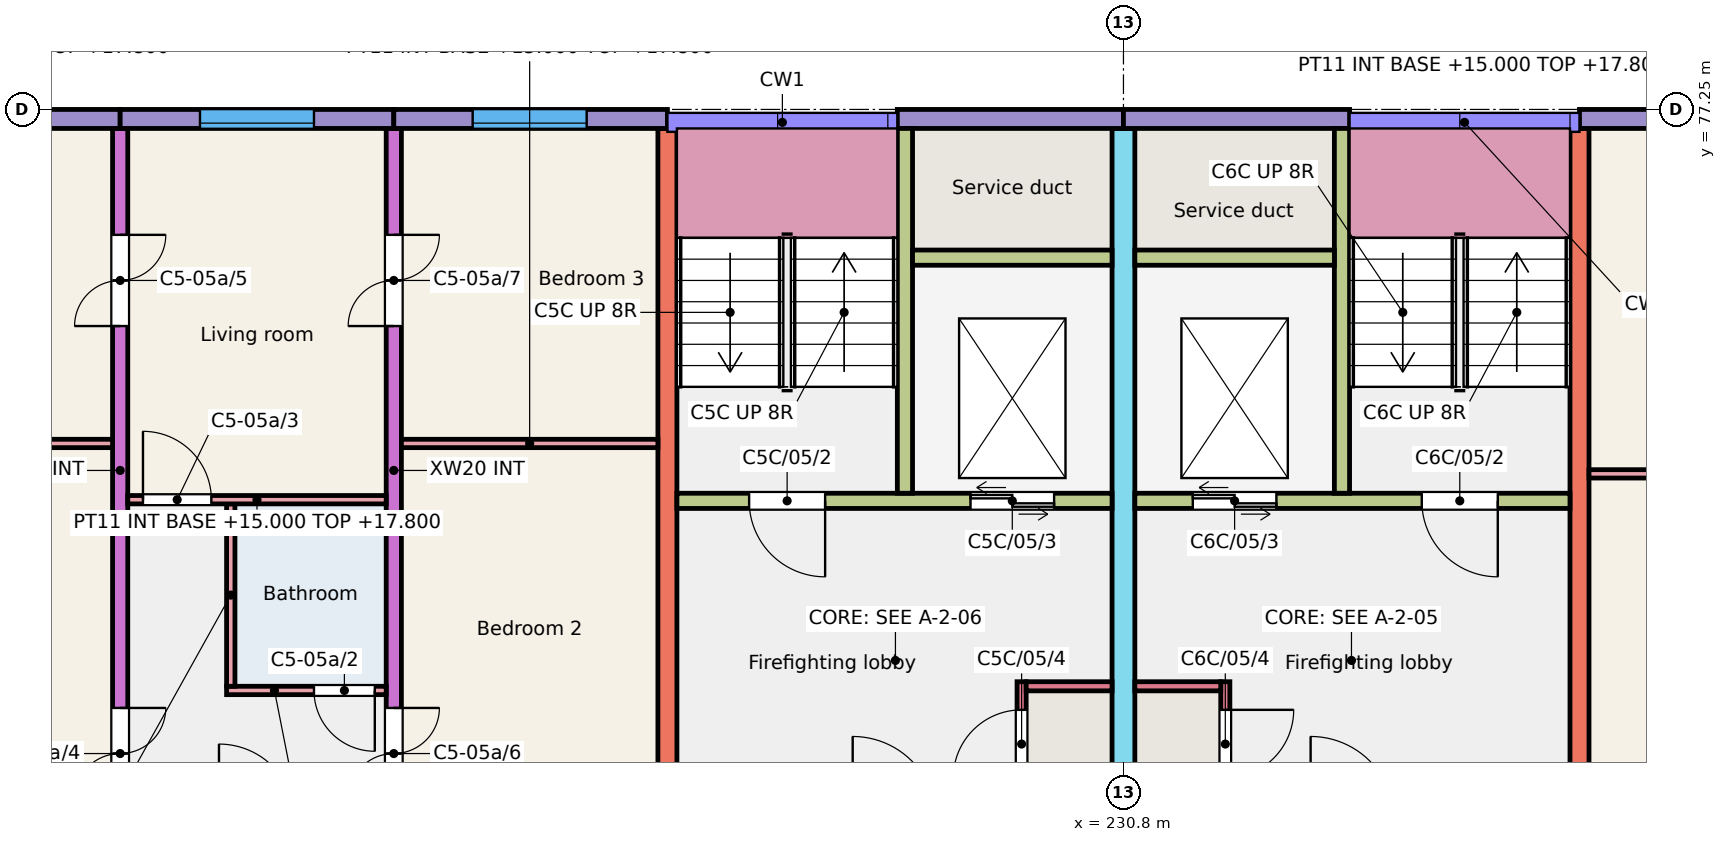
"""IFC4 building model, lengths in metres.
Left out: names, types, materials, properties, quantities, classifications, styles, units other than length and angle.
Written with IfcOpenShell. Run it as: python <this file> out.ifc"""

import sys

from ifc_helpers import new_model, si_unit, direction, frame, frame_2d, origin, place, context, subcontext, project, spatial, rectangle, extrude, element, fill, save


model = new_model("IFC4")
c1 = context("Model", 3, precision=1e-05, world=origin(), true_north=direction((0.0, 1.0)))
c2 = subcontext(c1, "Body", "Model", "MODEL_VIEW")
j1 = project(units=[si_unit("LENGTHUNIT", "METRE"), si_unit("PLANEANGLEUNIT", "RADIAN")], contexts=[c1])
p1 = place(None, origin())
s1 = spatial("IfcSite", under=j1, at=p1, CompositionType="ELEMENT")
p2 = place(p1, origin())
s2 = spatial("IfcBuilding", under=s1, at=p2, CompositionType="ELEMENT")
p3 = place(p2, frame((0.0, 0.0, 15.0)))
s3 = spatial("IfcBuildingStorey", under=s2, at=p3, CompositionType="ELEMENT", Elevation=15.0)
p4 = place(p3, frame((217.6, 68.0, 0.0), z_axis=(0.0, 0.0, 1.0), x_axis=(0.0, 1.0, 0.0)))
e1 = element("IfcWall", 1, at=p4, inside=s3, PredefinedType="SHEAR", context=c2, shape_type="SweptSolid", body=[
    extrude(rectangle(XDim=9.0, YDim=0.2, at=frame_2d((4.5, 0.0))), origin(), (0.0, 0.0, 1.0), 3.0),
])
p5 = place(p4, frame((0.175, 0.0, 0.0)))
e2 = element("IfcOpeningElement", 2, at=p5, cuts=e1, PredefinedType="OPENING", context=c2, shape_type="SweptSolid", body=[
    extrude(rectangle(XDim=1.2, YDim=2.1, at=frame_2d((0.6, 1.05))), frame((0.0, 0.11, 0.0), z_axis=(0.0, -1.0, 0.0), x_axis=(1.0, 0.0, 0.0)), (0.0, 0.0, 1.0), 0.22),
])
p6 = place(p4, frame((6.4, 0.0, 0.0)))
e3 = element("IfcOpeningElement", 3, at=p6, cuts=e1, PredefinedType="OPENING", context=c2, shape_type="SweptSolid", body=[
    extrude(rectangle(XDim=1.2, YDim=2.1, at=frame_2d((0.6, 1.05))), frame((0.0, 0.11, 0.0), z_axis=(0.0, -1.0, 0.0), x_axis=(1.0, 0.0, 0.0)), (0.0, 0.0, 1.0), 0.22),
])
p7 = place(p3, frame((221.2, 68.0, 0.0), z_axis=(0.0, 0.0, 1.0), x_axis=(0.0, 1.0, 0.0)))
e4 = element("IfcWall", 4, at=p7, inside=s3, PredefinedType="SHEAR", context=c2, shape_type="SweptSolid", body=[
    extrude(rectangle(XDim=9.0, YDim=0.2, at=frame_2d((4.5, 0.0))), origin(), (0.0, 0.0, 1.0), 3.0),
])
p8 = place(p7, frame((0.175, 0.0, 0.0)))
e5 = element("IfcOpeningElement", 5, at=p8, cuts=e4, PredefinedType="OPENING", context=c2, shape_type="SweptSolid", body=[
    extrude(rectangle(XDim=1.2, YDim=2.1, at=frame_2d((0.6, 1.05))), frame((0.0, 0.11, 0.0), z_axis=(0.0, -1.0, 0.0), x_axis=(1.0, 0.0, 0.0)), (0.0, 0.0, 1.0), 0.22),
])
p9 = place(p7, frame((6.4, 0.0, 0.0)))
e6 = element("IfcOpeningElement", 6, at=p9, cuts=e4, PredefinedType="OPENING", context=c2, shape_type="SweptSolid", body=[
    extrude(rectangle(XDim=1.2, YDim=2.1, at=frame_2d((0.6, 1.05))), frame((0.0, 0.11, 0.0), z_axis=(0.0, -1.0, 0.0), x_axis=(1.0, 0.0, 0.0)), (0.0, 0.0, 1.0), 0.22),
])
p10 = place(p3, frame((224.8, 68.0, 0.0), z_axis=(0.0, 0.0, 1.0), x_axis=(0.0, 1.0, 0.0)))
e7 = element("IfcWall", 7, at=p10, inside=s3, PredefinedType="SHEAR", context=c2, shape_type="SweptSolid", body=[
    extrude(rectangle(XDim=9.0, YDim=0.25, at=frame_2d((4.5, 0.0))), origin(), (0.0, 0.0, 1.0), 3.0),
])
p11 = place(p3, frame((230.8, 66.0, 0.0), z_axis=(0.0, 0.0, 1.0), x_axis=(0.0, 1.0, 0.0)))
e8 = element("IfcWall", 8, at=p11, inside=s3, PredefinedType="SHEAR", context=c2, shape_type="SweptSolid", body=[
    extrude(rectangle(XDim=11.0, YDim=0.3, at=frame_2d((5.5, 0.0))), origin(), (0.0, 0.0, 1.0), 3.0),
])
p12 = place(p11, frame((0.3, 0.0, 0.0)))
e9 = element("IfcOpeningElement", 9, at=p12, cuts=e8, PredefinedType="OPENING", context=c2, shape_type="SweptSolid", body=[
    extrude(rectangle(XDim=1.2, YDim=2.1, at=frame_2d((0.6, 1.05))), frame((0.0, 0.16, 0.0), z_axis=(0.0, -1.0, 0.0), x_axis=(1.0, 0.0, 0.0)), (0.0, 0.0, 1.0), 0.32),
])
p13 = place(p3, frame((236.8, 68.0, 0.0), z_axis=(0.0, 0.0, 1.0), x_axis=(0.0, 1.0, 0.0)))
e10 = element("IfcWall", 10, at=p13, inside=s3, PredefinedType="SHEAR", context=c2, shape_type="SweptSolid", body=[
    extrude(rectangle(XDim=9.0, YDim=0.25, at=frame_2d((4.5, 0.0))), origin(), (0.0, 0.0, 1.0), 3.0),
])
p14 = place(p3, frame((214.0, 77.125, 0.0), z_axis=(0.0, 0.0, 1.0), x_axis=(1.0, 0.0, 0.0)))
e11 = element("IfcWall", 11, at=p14, inside=s3, PredefinedType="SOLIDWALL", context=c2, shape_type="SweptSolid", body=[
    extrude(rectangle(XDim=3.6, YDim=0.25, at=frame_2d((1.8, 0.0))), origin(), (0.0, 0.0, 1.0), 3.0),
])
p15 = place(p14, frame((1.225, 0.0, 1.1)))
e12 = element("IfcOpeningElement", 12, at=p15, cuts=e11, PredefinedType="OPENING", context=c2, shape_type="SweptSolid", body=[
    extrude(rectangle(XDim=1.2, YDim=1.3, at=frame_2d((0.6, 0.65))), frame((0.0, 0.135, 0.0), z_axis=(0.0, -1.0, 0.0), x_axis=(1.0, 0.0, 0.0)), (0.0, 0.0, 1.0), 0.27),
])
p16 = place(p3, frame((217.6, 77.125, 0.0), z_axis=(0.0, 0.0, 1.0), x_axis=(1.0, 0.0, 0.0)))
e13 = element("IfcWall", 13, at=p16, inside=s3, PredefinedType="SOLIDWALL", context=c2, shape_type="SweptSolid", body=[
    extrude(rectangle(XDim=3.6, YDim=0.25, at=frame_2d((1.8, 0.0))), origin(), (0.0, 0.0, 1.0), 3.0),
])
p17 = place(p16, frame((1.05, 0.0, 0.9)))
e14 = element("IfcOpeningElement", 14, at=p17, cuts=e13, PredefinedType="OPENING", context=c2, shape_type="SweptSolid", body=[
    extrude(rectangle(XDim=1.5, YDim=1.5, at=frame_2d((0.75, 0.75))), frame((0.0, 0.135, 0.0), z_axis=(0.0, -1.0, 0.0), x_axis=(1.0, 0.0, 0.0)), (0.0, 0.0, 1.0), 0.27),
])
p18 = place(p3, frame((221.2, 77.125, 0.0), z_axis=(0.0, 0.0, 1.0), x_axis=(1.0, 0.0, 0.0)))
e15 = element("IfcWall", 15, at=p18, inside=s3, PredefinedType="SOLIDWALL", context=c2, shape_type="SweptSolid", body=[
    extrude(rectangle(XDim=3.6, YDim=0.25, at=frame_2d((1.8, 0.0))), origin(), (0.0, 0.0, 1.0), 3.0),
])
p19 = place(p18, frame((1.038, 0.0, 0.9)))
e16 = element("IfcOpeningElement", 16, at=p19, cuts=e15, PredefinedType="OPENING", context=c2, shape_type="SweptSolid", body=[
    extrude(rectangle(XDim=1.5, YDim=1.5, at=frame_2d((0.75, 0.75))), frame((0.0, 0.135, 0.0), z_axis=(0.0, -1.0, 0.0), x_axis=(1.0, 0.0, 0.0)), (0.0, 0.0, 1.0), 0.27),
])
p20 = place(p3, frame((227.825, 77.125, 0.0), z_axis=(0.0, 0.0, 1.0), x_axis=(1.0, 0.0, 0.0)))
e17 = element("IfcWall", 17, at=p20, inside=s3, PredefinedType="SOLIDWALL", context=c2, shape_type="SweptSolid", body=[
    extrude(rectangle(XDim=2.975, YDim=0.25, at=frame_2d((1.488, 0.0))), origin(), (0.0, 0.0, 1.0), 3.0),
])
p21 = place(p3, frame((224.925, 72.1, 0.0), z_axis=(0.0, 0.0, 1.0), x_axis=(1.0, 0.0, 0.0)))
e18 = element("IfcWall", 18, at=p21, inside=s3, PredefinedType="SHEAR", context=c2, shape_type="SweptSolid", body=[
    extrude(rectangle(XDim=5.725, YDim=0.2, at=frame_2d((2.862, 0.0))), origin(), (0.0, 0.0, 1.0), 3.0),
])
p22 = place(p21, frame((0.95, 0.0, 0.0)))
e19 = element("IfcOpeningElement", 19, at=p22, cuts=e18, PredefinedType="OPENING", context=c2, shape_type="SweptSolid", body=[
    extrude(rectangle(XDim=1.0, YDim=2.1, at=frame_2d((0.5, 1.05))), frame((0.0, 0.11, 0.0), z_axis=(0.0, -1.0, 0.0), x_axis=(1.0, 0.0, 0.0)), (0.0, 0.0, 1.0), 0.22),
])
p23 = place(p21, frame((3.863, 0.0, 0.0)))
e20 = element("IfcOpeningElement", 20, at=p23, cuts=e18, PredefinedType="OPENING", context=c2, shape_type="SweptSolid", body=[
    extrude(rectangle(XDim=1.1, YDim=2.1, at=frame_2d((0.55, 1.05))), frame((0.0, 0.11, 0.0), z_axis=(0.0, -1.0, 0.0), x_axis=(1.0, 0.0, 0.0)), (0.0, 0.0, 1.0), 0.22),
])
p24 = place(p3, frame((227.925, 72.2, 0.0), z_axis=(0.0, 0.0, 1.0), x_axis=(0.0, 1.0, 0.0)))
e21 = element("IfcWall", 21, at=p24, inside=s3, PredefinedType="SHEAR", context=c2, shape_type="SweptSolid", body=[
    extrude(rectangle(XDim=4.8, YDim=0.2, at=frame_2d((2.4, 0.0))), origin(), (0.0, 0.0, 1.0), 3.0),
])
p25 = place(p3, frame((228.025, 75.3, 0.0), z_axis=(0.0, 0.0, 1.0), x_axis=(1.0, 0.0, 0.0)))
e22 = element("IfcWall", 22, at=p25, inside=s3, PredefinedType="SHEAR", context=c2, shape_type="SweptSolid", body=[
    extrude(rectangle(XDim=2.625, YDim=0.2, at=frame_2d((1.312, 0.0))), origin(), (0.0, 0.0, 1.0), 3.0),
])
p26 = place(p3, frame((229.46, 68.0, 0.0), z_axis=(0.0, 0.0, 1.0), x_axis=(0.0, 1.0, 0.0)))
e23 = element("IfcWall", 23, at=p26, inside=s3, PredefinedType="SHEAR", context=c2, shape_type="SweptSolid", body=[
    extrude(rectangle(XDim=1.72, YDim=0.12, at=frame_2d((0.86, 0.0))), origin(), (0.0, 0.0, 1.0), 3.0),
])
p27 = place(p26, frame((0.45, 0.0, 0.0)))
e24 = element("IfcOpeningElement", 24, at=p27, cuts=e23, PredefinedType="OPENING", context=c2, shape_type="SweptSolid", body=[
    extrude(rectangle(XDim=0.9, YDim=2.1, at=frame_2d((0.45, 1.05))), frame((0.0, 0.07, 0.0), z_axis=(0.0, -1.0, 0.0), x_axis=(1.0, 0.0, 0.0)), (0.0, 0.0, 1.0), 0.14),
])
p28 = place(p3, frame((229.52, 69.66, 0.0), z_axis=(0.0, 0.0, 1.0), x_axis=(1.0, 0.0, 0.0)))
e25 = element("IfcWall", 25, at=p28, inside=s3, PredefinedType="SHEAR", context=c2, shape_type="SweptSolid", body=[
    extrude(rectangle(XDim=1.13, YDim=0.12, at=frame_2d((0.565, 0.0))), origin(), (0.0, 0.0, 1.0), 3.0),
])
p29 = place(p3, frame((230.8, 77.125, 0.0), z_axis=(0.0, 0.0, 1.0), x_axis=(1.0, 0.0, 0.0)))
e26 = element("IfcWall", 26, at=p29, inside=s3, PredefinedType="SOLIDWALL", context=c2, shape_type="SweptSolid", body=[
    extrude(rectangle(XDim=2.975, YDim=0.25, at=frame_2d((1.487, 0.0))), origin(), (0.0, 0.0, 1.0), 3.0),
])
p30 = place(p3, frame((230.95, 72.1, 0.0), z_axis=(0.0, 0.0, 1.0), x_axis=(1.0, 0.0, 0.0)))
e27 = element("IfcWall", 27, at=p30, inside=s3, PredefinedType="SHEAR", context=c2, shape_type="SweptSolid", body=[
    extrude(rectangle(XDim=5.725, YDim=0.2, at=frame_2d((2.863, 0.0))), origin(), (0.0, 0.0, 1.0), 3.0),
])
p31 = place(p30, frame((3.775, 0.0, 0.0)))
e28 = element("IfcOpeningElement", 28, at=p31, cuts=e27, PredefinedType="OPENING", context=c2, shape_type="SweptSolid", body=[
    extrude(rectangle(XDim=1.0, YDim=2.1, at=frame_2d((0.5, 1.05))), frame((0.0, 0.11, 0.0), z_axis=(0.0, -1.0, 0.0), x_axis=(1.0, 0.0, 0.0)), (0.0, 0.0, 1.0), 0.22),
])
p32 = place(p30, frame((0.762, 0.0, 0.0)))
e29 = element("IfcOpeningElement", 29, at=p32, cuts=e27, PredefinedType="OPENING", context=c2, shape_type="SweptSolid", body=[
    extrude(rectangle(XDim=1.1, YDim=2.1, at=frame_2d((0.55, 1.05))), frame((0.0, 0.11, 0.0), z_axis=(0.0, -1.0, 0.0), x_axis=(1.0, 0.0, 0.0)), (0.0, 0.0, 1.0), 0.22),
])
p33 = place(p3, frame((233.675, 72.2, 0.0), z_axis=(0.0, 0.0, 1.0), x_axis=(0.0, 1.0, 0.0)))
e30 = element("IfcWall", 30, at=p33, inside=s3, PredefinedType="SHEAR", context=c2, shape_type="SweptSolid", body=[
    extrude(rectangle(XDim=4.8, YDim=0.2, at=frame_2d((2.4, 0.0))), origin(), (0.0, 0.0, 1.0), 3.0),
])
p34 = place(p3, frame((230.95, 75.3, 0.0), z_axis=(0.0, 0.0, 1.0), x_axis=(1.0, 0.0, 0.0)))
e31 = element("IfcWall", 31, at=p34, inside=s3, PredefinedType="SHEAR", context=c2, shape_type="SweptSolid", body=[
    extrude(rectangle(XDim=2.625, YDim=0.2, at=frame_2d((1.312, 0.0))), origin(), (0.0, 0.0, 1.0), 3.0),
])
p35 = place(p3, frame((232.14, 68.0, 0.0), z_axis=(0.0, 0.0, 1.0), x_axis=(0.0, 1.0, 0.0)))
e32 = element("IfcWall", 32, at=p35, inside=s3, PredefinedType="SHEAR", context=c2, shape_type="SweptSolid", body=[
    extrude(rectangle(XDim=1.72, YDim=0.12, at=frame_2d((0.86, 0.0))), origin(), (0.0, 0.0, 1.0), 3.0),
])
p36 = place(p35, frame((0.45, 0.0, 0.0)))
e33 = element("IfcOpeningElement", 33, at=p36, cuts=e32, PredefinedType="OPENING", context=c2, shape_type="SweptSolid", body=[
    extrude(rectangle(XDim=0.9, YDim=2.1, at=frame_2d((0.45, 1.05))), frame((0.0, 0.07, 0.0), z_axis=(0.0, -1.0, 0.0), x_axis=(1.0, 0.0, 0.0)), (0.0, 0.0, 1.0), 0.14),
])
p37 = place(p3, frame((230.95, 69.66, 0.0), z_axis=(0.0, 0.0, 1.0), x_axis=(1.0, 0.0, 0.0)))
e34 = element("IfcWall", 34, at=p37, inside=s3, PredefinedType="SHEAR", context=c2, shape_type="SweptSolid", body=[
    extrude(rectangle(XDim=1.13, YDim=0.12, at=frame_2d((0.565, 0.0))), origin(), (0.0, 0.0, 1.0), 3.0),
])
p38 = place(p3, frame((236.8, 77.125, 0.0), z_axis=(0.0, 0.0, 1.0), x_axis=(1.0, 0.0, 0.0)))
e35 = element("IfcWall", 35, at=p38, inside=s3, PredefinedType="SOLIDWALL", context=c2, shape_type="SweptSolid", body=[
    extrude(rectangle(XDim=3.6, YDim=0.25, at=frame_2d((1.8, 0.0))), origin(), (0.0, 0.0, 1.0), 3.0),
])
p39 = place(p38, frame((1.062, 0.0, 0.9)))
e36 = element("IfcOpeningElement", 36, at=p39, cuts=e35, PredefinedType="OPENING", context=c2, shape_type="SweptSolid", body=[
    extrude(rectangle(XDim=1.5, YDim=1.5, at=frame_2d((0.75, 0.75))), frame((0.0, 0.135, 0.0), z_axis=(0.0, -1.0, 0.0), x_axis=(1.0, 0.0, 0.0)), (0.0, 0.0, 1.0), 0.27),
])
p40 = place(p3, frame((219.0, 69.605, 0.0), z_axis=(0.0, 0.0, 1.0), x_axis=(1.0, 0.0, 0.0)))
e37 = element("IfcWall", 37, at=p40, inside=s3, PredefinedType="PARTITIONING", context=c2, shape_type="SweptSolid", body=[
    extrude(rectangle(XDim=2.1, YDim=0.11, at=frame_2d((1.05, 0.0))), origin(), (0.0, 0.0, 1.0), 2.8),
])
p41 = place(p40, frame((1.15, 0.0, 0.0)))
e38 = element("IfcOpeningElement", 38, at=p41, cuts=e37, PredefinedType="OPENING", context=c2, shape_type="SweptSolid", body=[
    extrude(rectangle(XDim=0.8, YDim=2.1, at=frame_2d((0.4, 1.05))), frame((0.0, 0.065, 0.0), z_axis=(0.0, -1.0, 0.0), x_axis=(1.0, 0.0, 0.0)), (0.0, 0.0, 1.0), 0.13),
])
p42 = place(p3, frame((219.055, 69.66, 0.0), z_axis=(0.0, 0.0, 1.0), x_axis=(0.0, 1.0, 0.0)))
e39 = element("IfcWall", 39, at=p42, inside=s3, PredefinedType="PARTITIONING", context=c2, shape_type="SweptSolid", body=[
    extrude(rectangle(XDim=2.4, YDim=0.11, at=frame_2d((1.2, 0.0))), origin(), (0.0, 0.0, 1.0), 2.8),
])
p43 = place(p3, frame((217.7, 72.115, 0.0), z_axis=(0.0, 0.0, 1.0), x_axis=(1.0, 0.0, 0.0)))
e40 = element("IfcWall", 40, at=p43, inside=s3, PredefinedType="PARTITIONING", context=c2, shape_type="SweptSolid", body=[
    extrude(rectangle(XDim=3.4, YDim=0.11, at=frame_2d((1.7, 0.0))), origin(), (0.0, 0.0, 1.0), 2.8),
])
p44 = place(p43, frame((0.2, 0.0, 0.0)))
e41 = element("IfcOpeningElement", 41, at=p44, cuts=e40, PredefinedType="OPENING", context=c2, shape_type="SweptSolid", body=[
    extrude(rectangle(XDim=0.9, YDim=2.1, at=frame_2d((0.45, 1.05))), frame((0.0, 0.065, 0.0), z_axis=(0.0, -1.0, 0.0), x_axis=(1.0, 0.0, 0.0)), (0.0, 0.0, 1.0), 0.13),
])
p45 = place(p3, frame((214.15, 72.855, 0.0), z_axis=(0.0, 0.0, 1.0), x_axis=(1.0, 0.0, 0.0)))
e42 = element("IfcWall", 42, at=p45, inside=s3, PredefinedType="PARTITIONING", context=c2, shape_type="SweptSolid", body=[
    extrude(rectangle(XDim=3.35, YDim=0.11, at=frame_2d((1.675, 0.0))), origin(), (0.0, 0.0, 1.0), 2.8),
])
for number, where, z_axis, x_axis in (
    (43, (221.3, 72.855, 0.0), (0.0, 0.0, 1.0), (1.0, 0.0, 0.0)),
    (44, (236.925, 72.455, 0.0), (0.0, 0.0, 1.0), (1.0, 0.0, 0.0)),
):
    element("IfcWall", number, at=place(p3, frame(where, z_axis=z_axis, x_axis=x_axis)), inside=s3, PredefinedType="PARTITIONING", context=c2, shape_type="SweptSolid", body=[
        extrude(rectangle(XDim=3.375, YDim=0.11, at=frame_2d((1.688, 0.0))), origin(), (0.0, 0.0, 1.0), 2.8),
    ])
p46 = place(p19, origin())
e45 = element("IfcWindow", 45, at=p46, inside=s3, PartitioningType="SINGLE_PANEL", PredefinedType="WINDOW", context=c2, shape_type="SweptSolid", body=[
    extrude(rectangle(XDim=1.5, YDim=1.5, at=frame_2d((0.75, 0.75))), frame((0.0, -0.025, 0.0), z_axis=(0.0, -1.0, 0.0), x_axis=(1.0, 0.0, 0.0)), (0.0, 0.0, 1.0), 0.06),
])
fill(e16, e45)
p47 = place(p17, origin())
e46 = element("IfcWindow", 46, at=p47, inside=s3, PartitioningType="SINGLE_PANEL", PredefinedType="WINDOW", context=c2, shape_type="SweptSolid", body=[
    extrude(rectangle(XDim=1.5, YDim=1.5, at=frame_2d((0.75, 0.75))), frame((0.0, -0.025, 0.0), z_axis=(0.0, -1.0, 0.0), x_axis=(1.0, 0.0, 0.0)), (0.0, 0.0, 1.0), 0.06),
])
fill(e14, e46)
p48 = place(p41, origin())
e47 = element("IfcDoor", 47, at=p48, inside=s3, OperationType="SINGLE_SWING_RIGHT", PredefinedType="DOOR", context=c2, shape_type="SweptSolid", body=[
    extrude(rectangle(XDim=0.8, YDim=2.1, at=frame_2d((0.4, 1.05))), frame((0.0, 0.025, 0.0), z_axis=(0.0, -1.0, 0.0), x_axis=(1.0, 0.0, 0.0)), (0.0, 0.0, 1.0), 0.05),
])
fill(e38, e47)
p49 = place(p44, origin())
e48 = element("IfcDoor", 48, at=p49, inside=s3, OperationType="SINGLE_SWING_LEFT", PredefinedType="DOOR", context=c2, shape_type="SweptSolid", body=[
    extrude(rectangle(XDim=0.9, YDim=2.1, at=frame_2d((0.45, 1.05))), frame((0.0, 0.025, 0.0), z_axis=(0.0, -1.0, 0.0), x_axis=(1.0, 0.0, 0.0)), (0.0, 0.0, 1.0), 0.05),
])
fill(e41, e48)
p50 = place(p5, origin())
e49 = element("IfcDoor", 49, at=p50, inside=s3, OperationType="DOUBLE_DOOR_SINGLE_SWING", PredefinedType="DOOR", context=c2, shape_type="SweptSolid", body=[
    extrude(rectangle(XDim=1.2, YDim=2.1, at=frame_2d((0.6, 1.05))), frame((0.0, 0.025, 0.0), z_axis=(0.0, -1.0, 0.0), x_axis=(1.0, 0.0, 0.0)), (0.0, 0.0, 1.0), 0.05),
])
fill(e2, e49)
p51 = place(p6, origin())
e50 = element("IfcDoor", 50, at=p51, inside=s3, OperationType="DOUBLE_DOOR_SINGLE_SWING", PredefinedType="DOOR", context=c2, shape_type="SweptSolid", body=[
    extrude(rectangle(XDim=1.2, YDim=2.1, at=frame_2d((0.6, 1.05))), frame((0.0, 0.025, 0.0), z_axis=(0.0, -1.0, 0.0), x_axis=(1.0, 0.0, 0.0)), (0.0, 0.0, 1.0), 0.05),
])
fill(e3, e50)
p52 = place(p8, origin())
e51 = element("IfcDoor", 51, at=p52, inside=s3, OperationType="DOUBLE_DOOR_SINGLE_SWING", PredefinedType="DOOR", context=c2, shape_type="SweptSolid", body=[
    extrude(rectangle(XDim=1.2, YDim=2.1, at=frame_2d((0.6, 1.05))), frame((0.0, 0.025, 0.0), z_axis=(0.0, -1.0, 0.0), x_axis=(1.0, 0.0, 0.0)), (0.0, 0.0, 1.0), 0.05),
])
fill(e5, e51)
p53 = place(p9, origin())
e52 = element("IfcDoor", 52, at=p53, inside=s3, OperationType="DOUBLE_DOOR_SINGLE_SWING", PredefinedType="DOOR", context=c2, shape_type="SweptSolid", body=[
    extrude(rectangle(XDim=1.2, YDim=2.1, at=frame_2d((0.6, 1.05))), frame((0.0, 0.025, 0.0), z_axis=(0.0, -1.0, 0.0), x_axis=(1.0, 0.0, 0.0)), (0.0, 0.0, 1.0), 0.05),
])
fill(e6, e52)
p54 = place(p22, origin())
e53 = element("IfcDoor", 53, at=p54, inside=s3, OperationType="SINGLE_SWING_RIGHT", PredefinedType="DOOR", context=c2, shape_type="SweptSolid", body=[
    extrude(rectangle(XDim=1.0, YDim=2.1, at=frame_2d((0.5, 1.05))), frame((0.0, 0.025, 0.0), z_axis=(0.0, -1.0, 0.0), x_axis=(1.0, 0.0, 0.0)), (0.0, 0.0, 1.0), 0.05),
])
fill(e19, e53)
p55 = place(p23, origin())
e54 = element("IfcDoor", 54, at=p55, inside=s3, OperationType="DOUBLE_DOOR_SLIDING", PredefinedType="DOOR", context=c2, shape_type="SweptSolid", body=[
    extrude(rectangle(XDim=1.1, YDim=2.1, at=frame_2d((0.55, 1.05))), frame((0.0, 0.025, 0.0), z_axis=(0.0, -1.0, 0.0), x_axis=(1.0, 0.0, 0.0)), (0.0, 0.0, 1.0), 0.05),
])
fill(e20, e54)
p56 = place(p27, origin())
e55 = element("IfcDoor", 55, at=p56, inside=s3, OperationType="SINGLE_SWING_LEFT", PredefinedType="DOOR", context=c2, shape_type="SweptSolid", body=[
    extrude(rectangle(XDim=0.9, YDim=2.1, at=frame_2d((0.45, 1.05))), frame((0.0, 0.025, 0.0), z_axis=(0.0, -1.0, 0.0), x_axis=(1.0, 0.0, 0.0)), (0.0, 0.0, 1.0), 0.05),
])
fill(e24, e55)
p57 = place(p31, origin())
e56 = element("IfcDoor", 56, at=p57, inside=s3, OperationType="SINGLE_SWING_RIGHT", PredefinedType="DOOR", context=c2, shape_type="SweptSolid", body=[
    extrude(rectangle(XDim=1.0, YDim=2.1, at=frame_2d((0.5, 1.05))), frame((0.0, 0.025, 0.0), z_axis=(0.0, -1.0, 0.0), x_axis=(1.0, 0.0, 0.0)), (0.0, 0.0, 1.0), 0.05),
])
fill(e28, e56)
p58 = place(p32, origin())
e57 = element("IfcDoor", 57, at=p58, inside=s3, OperationType="DOUBLE_DOOR_SLIDING", PredefinedType="DOOR", context=c2, shape_type="SweptSolid", body=[
    extrude(rectangle(XDim=1.1, YDim=2.1, at=frame_2d((0.55, 1.05))), frame((0.0, 0.025, 0.0), z_axis=(0.0, -1.0, 0.0), x_axis=(1.0, 0.0, 0.0)), (0.0, 0.0, 1.0), 0.05),
])
fill(e29, e57)
p59 = place(p36, origin())
e58 = element("IfcDoor", 58, at=p59, inside=s3, OperationType="SINGLE_SWING_RIGHT", PredefinedType="DOOR", context=c2, shape_type="SweptSolid", body=[
    extrude(rectangle(XDim=0.9, YDim=2.1, at=frame_2d((0.45, 1.05))), frame((0.0, 0.025, 0.0), z_axis=(0.0, -1.0, 0.0), x_axis=(1.0, 0.0, 0.0)), (0.0, 0.0, 1.0), 0.05),
])
fill(e33, e58)
save(model, sys.argv[1])
